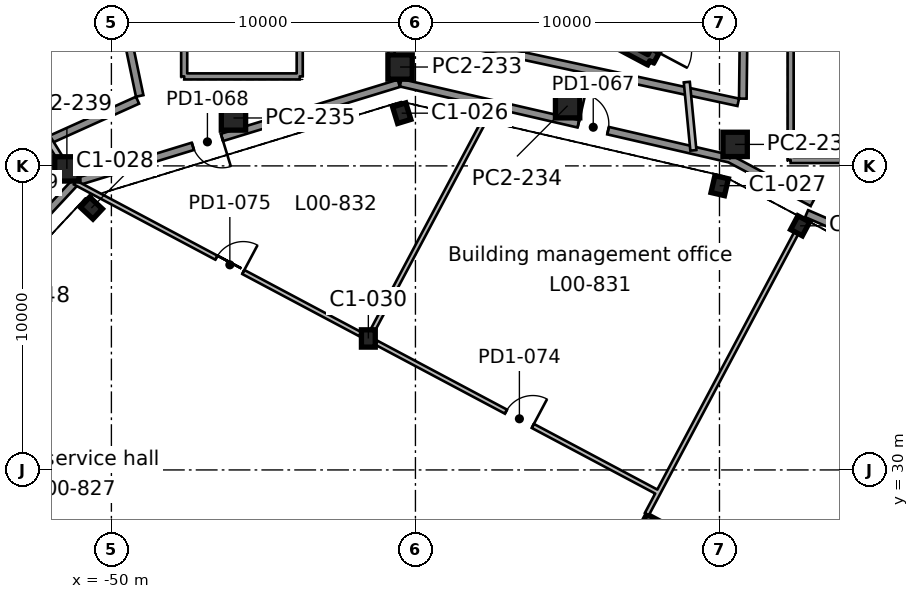
"""IFC4 building model, lengths in metres.
Left out: names, types, materials, properties, quantities, classifications, styles, units other than length and angle.
Written with IfcOpenShell. Run it as: python <this file> out.ifc"""

import sys

from ifc_helpers import new_model, si_unit, direction, frame, frame_2d, origin, origin_2d, place, context, subcontext, project, spatial, rectangle, i_section, extrude, element, fill, save


model = new_model("IFC4")
c1 = context("Model", 3, precision=1e-05, world=origin(), true_north=direction((0.0, 1.0)))
c2 = subcontext(c1, "Body", "Model", "MODEL_VIEW")
j1 = project(units=[si_unit("LENGTHUNIT", "METRE"), si_unit("PLANEANGLEUNIT", "RADIAN")], contexts=[c1])
p1 = place(None, origin())
s1 = spatial("IfcSite", under=j1, at=p1, CompositionType="ELEMENT")
p2 = place(p1, origin())
s2 = spatial("IfcBuilding", under=s1, at=p2, CompositionType="ELEMENT")
p3 = place(p2, origin())
s3 = spatial("IfcBuildingStorey", under=s2, at=p3, CompositionType="ELEMENT", Elevation=0.0)
p4 = place(p3, frame((-41.549, 34.324, 0.0), z_axis=(0.0, 0.0, 1.0), x_axis=(1.0, 0.0, 0.0)))
e1 = element("IfcColumn", 1, at=p4, inside=s3, PredefinedType="COLUMN", context=c2, shape_type="SweptSolid", body=[
    extrude(i_section(OverallWidth=0.455, OverallDepth=0.569, WebThickness=0.078, FlangeThickness=0.125, FilletRadius=0.015, at=origin_2d()), origin(), (0.0, 0.0, 1.0), 7.0),
])
p5 = place(p3, frame((-27.347, 38.03, 0.0), z_axis=(0.0, 0.0, 1.0), x_axis=(-0.882947592859, 0.469471562786, 0.0)))
e2 = element("IfcColumn", 2, at=p5, inside=s3, PredefinedType="COLUMN", context=c2, shape_type="SweptSolid", body=[
    extrude(i_section(OverallWidth=0.437, OverallDepth=0.513, WebThickness=0.061, FlangeThickness=0.097, FilletRadius=0.015, at=origin_2d()), origin(), (0.0, 0.0, 1.0), 7.0),
])
for number, where, z_axis, x_axis in (
    (3, (-50.66, 38.613, 0.0), (0.0, 0.0, 1.0), (-0.682, -0.731, 0.0)),
    (4, (-29.993, 39.35, 0.0), (0.0, 0.0, 1.0), (-0.974, 0.225, 0.0)),
    (5, (-40.452, 41.734, 0.0), (0.0, 0.0, 1.0), (-0.956, -0.292, 0.0)),
):
    element("IfcColumn", number, at=place(p3, frame(where, z_axis=z_axis, x_axis=x_axis)), inside=s3, PredefinedType="COLUMN", context=c2, shape_type="SweptSolid", body=[
        extrude(i_section(OverallWidth=0.455, OverallDepth=0.569, WebThickness=0.078, FlangeThickness=0.125, FilletRadius=0.015, at=origin_2d()), origin(), (0.0, 0.0, 1.0), 7.0),
    ])
p6 = place(p3, frame((-31.992, 28.336, 0.0), z_axis=(0.0, 0.0, 1.0), x_axis=(-0.46947084998, -0.882947971864, 0.0)))
e6 = element("IfcWall", 6, at=p6, inside=s3, PredefinedType="SHEAR", context=c2, shape_type="SweptSolid", body=[
    extrude(rectangle(XDim=20.0, YDim=0.9, at=frame_2d((10.0, 0.0))), origin(), (0.0, 0.0, 1.0), 7.0),
])
p7 = place(p6, frame((10.6, 0.0, 0.0)))
e7 = element("IfcOpeningElement", 7, at=p7, cuts=e6, PredefinedType="OPENING", context=c2, shape_type="SweptSolid", body=[
    extrude(rectangle(XDim=2.4, YDim=2.4, at=frame_2d((1.2, 1.2))), frame((0.0, 0.46, 0.0), z_axis=(0.0, -1.0, 0.0), x_axis=(1.0, 0.0, 0.0)), (0.0, 0.0, 1.0), 0.92),
])
p8 = place(p3, frame((-28.396, 50.784, 0.0), z_axis=(0.0, 0.0, 1.0), x_axis=(-0.469464178475, -0.882951519127, 0.0)))
e8 = element("IfcWall", 8, at=p8, inside=s3, PredefinedType="SHEAR", context=c2, shape_type="SweptSolid", body=[
    extrude(rectangle(XDim=8.3, YDim=0.3, at=frame_2d((4.15, 0.0))), origin(), (0.0, 0.0, 1.0), 7.0),
])
p9 = place(p8, frame((6.725, 0.0, 0.0)))
e9 = element("IfcOpeningElement", 9, at=p9, cuts=e8, PredefinedType="OPENING", context=c2, shape_type="SweptSolid", body=[
    extrude(rectangle(XDim=1.2, YDim=2.1, at=frame_2d((0.6, 1.05))), frame((0.0, 0.16, 0.0), z_axis=(0.0, -1.0, 0.0), x_axis=(1.0, 0.0, 0.0)), (0.0, 0.0, 1.0), 0.32),
])
p10 = place(p3, frame((-32.293, 43.456, 0.0), z_axis=(0.0, 0.0, 1.0), x_axis=(-0.882948761726, 0.46946936446, 0.0)))
e10 = element("IfcWall", 10, at=p10, inside=s3, PredefinedType="SHEAR", context=c2, shape_type="SweptSolid", body=[
    extrude(rectangle(XDim=3.75, YDim=0.3, at=frame_2d((1.875, 0.0))), origin(), (0.0, 0.0, 1.0), 7.0),
])
for number, where, z_axis, x_axis in (
    (11, (-51.464, 39.901, 0.0), (0.0, 0.0, 1.0), (1.0, 0.0, 0.0)),
    (12, (-29.485, 40.707, 0.0), (0.0, 0.0, 1.0), (1.0, 0.0, 0.0)),
    (13, (-45.985, 41.576, 0.0), (0.0, 0.0, 1.0), (1.0, 0.0, 0.0)),
    (14, (-34.995, 41.979, 0.0), (0.0, 0.0, 1.0), (1.0, 0.0, 0.0)),
    (15, (-40.505, 43.252, 0.0), (0.0, 0.0, 1.0), (1.0, 0.0, 0.0)),
):
    element("IfcColumn", number, at=place(p3, frame(where, z_axis=z_axis, x_axis=x_axis)), inside=s3, PredefinedType="COLUMN", context=c2, shape_type="SweptSolid", body=[
        extrude(rectangle(XDim=0.8, YDim=0.8, at=origin_2d()), origin(), (0.0, 0.0, 1.0), 6.37),
    ])
p11 = place(p3, frame((-29.205, 44.545, 7.0), z_axis=(0.0, 0.0, 1.0), x_axis=(-0.011825442041, -0.999930077016, 0.0)))
e16 = element("IfcWall", 16, at=p11, inside=s3, PredefinedType="STANDARD", context=c2, shape_type="SweptSolid", body=[
    extrude(rectangle(XDim=2.333, YDim=0.25, at=frame_2d((1.167, 0.0))), origin(), (0.0, 0.0, 1.0), 0.65),
])
p12 = place(p3, frame((-29.384, 42.092, 7.0), z_axis=(0.0, 0.0, 1.0), x_axis=(-0.977492846538, 0.210968563929, 0.0)))
e17 = element("IfcWall", 17, at=p12, inside=s3, PredefinedType="STANDARD", context=c2, shape_type="SweptSolid", body=[
    extrude(rectangle(XDim=11.025, YDim=0.25, at=frame_2d((5.512, 0.0))), origin(), (0.0, 0.0, 1.0), 0.65),
])
p13 = place(p3, frame((-49.387, 43.82, 7.0), z_axis=(0.0, 0.0, 1.0), x_axis=(0.204607360425, -0.978844128582, 0.0)))
e18 = element("IfcWall", 18, at=p13, inside=s3, PredefinedType="STANDARD", context=c2, shape_type="SweptSolid", body=[
    extrude(rectangle(XDim=1.552, YDim=0.25, at=frame_2d((0.776, 0.0))), origin(), (0.0, 0.0, 1.0), 0.65),
])
p14 = place(p3, frame((-49.14, 42.161, 7.0), z_axis=(0.0, 0.0, 1.0), x_axis=(-0.911744798019, -0.410757134187, 0.0)))
e19 = element("IfcWall", 19, at=p14, inside=s3, PredefinedType="STANDARD", context=c2, shape_type="SweptSolid", body=[
    extrude(rectangle(XDim=3.518, YDim=0.25, at=frame_2d((1.759, 0.0))), origin(), (0.0, 0.0, 1.0), 0.65),
])
for number, where, z_axis, x_axis in (
    (20, (-23.86, 40.193, 6.92), (0.0, 0.0, 1.0), (-1.0, 0.0, 0.0)),
    (21, (-27.66, 40.193, 6.92), (0.0, 0.0, 1.0), (0.0, 1.0, 0.0)),
):
    element("IfcWall", number, at=place(p3, frame(where, z_axis=z_axis, x_axis=x_axis)), inside=s3, PredefinedType="SOLIDWALL", context=c2, shape_type="SweptSolid", body=[
        extrude(rectangle(XDim=3.8, YDim=0.2, at=frame_2d((1.9, 0.0))), origin(), (0.0, 0.0, 1.0), 0.18),
    ])
p15 = place(p3, frame((-43.806, 42.943, 6.92), z_axis=(0.0, 0.0, 1.0), x_axis=(-1.0, 0.0, 0.0)))
e22 = element("IfcWall", 22, at=p15, inside=s3, PredefinedType="SOLIDWALL", context=c2, shape_type="SweptSolid", body=[
    extrude(rectangle(XDim=3.8, YDim=0.2, at=frame_2d((1.9, 0.0))), origin(), (0.0, 0.0, 1.0), 0.18),
])
for number, where, z_axis, x_axis in (
    (23, (-47.606, 42.943, 6.92), (0.0, 0.0, 1.0), (0.0, 1.0, 0.0)),
    (24, (-43.806, 46.743, 6.92), (0.0, 0.0, 1.0), (0.0, -1.0, 0.0)),
):
    element("IfcWall", number, at=place(p3, frame(where, z_axis=z_axis, x_axis=x_axis)), inside=s3, PredefinedType="SOLIDWALL", context=c2, shape_type="SweptSolid", body=[
        extrude(rectangle(XDim=3.8, YDim=0.2, at=frame_2d((1.9, 0.0))), origin(), (0.0, 0.0, 1.0), 0.18),
    ])
p16 = place(p3, frame((-31.075, 42.757, 0.0), z_axis=(0.0, 0.0, 1.0), x_axis=(0.095978377299, -0.995383419136, 0.0)))
e25 = element("IfcWall", 25, at=p16, inside=s3, PredefinedType="PARTITIONING", context=c2, shape_type="SweptSolid", body=[
    extrude(rectangle(XDim=2.256, YDim=0.2, at=frame_2d((1.128, 0.0))), origin(), (0.0, 0.0, 1.0), 6.37),
])
p17 = place(p3, frame((-30.853, 40.51, 0.0), z_axis=(0.0, 0.0, 1.0), x_axis=(0.974387829677, -0.224874092276, 0.0)))
e26 = element("IfcWall", 26, at=p17, inside=s3, PredefinedType="SOLIDWALL", context=c2, shape_type="SweptSolid", body=[
    extrude(rectangle(XDim=1.222, YDim=0.25, at=frame_2d((0.611, 0.0))), origin(), (0.0, 0.0, 1.0), 6.37),
])
p18 = place(p3, frame((-29.662, 40.235, 0.0), z_axis=(0.0, 0.0, 1.0), x_axis=(0.882951412921, -0.469464378224, 0.0)))
e27 = element("IfcWall", 27, at=p18, inside=s3, PredefinedType="SOLIDWALL", context=c2, shape_type="SweptSolid", body=[
    extrude(rectangle(XDim=3.079, YDim=0.25, at=frame_2d((1.54, 0.0))), origin(), (0.0, 0.0, 1.0), 6.37),
])
p19 = place(p3, frame((-27.134, 38.43, 0.0), z_axis=(0.0, 0.0, 1.0), x_axis=(0.918029849315, -0.396511280756, 0.0)))
e28 = element("IfcWall", 28, at=p19, inside=s3, PredefinedType="SOLIDWALL", context=c2, shape_type="SweptSolid", body=[
    extrude(rectangle(XDim=5.033, YDim=0.25, at=frame_2d((2.517, 0.0))), origin(), (0.0, 0.0, 1.0), 6.37),
])
p20 = place(p3, frame((-42.583, 52.754, 0.0), z_axis=(0.0, 0.0, 1.0), x_axis=(0.195149741705, -0.980773459221, 0.0)))
e29 = element("IfcWall", 29, at=p20, inside=s3, PredefinedType="PARTITIONING", context=c2, shape_type="SweptSolid", body=[
    extrude(rectangle(XDim=9.28, YDim=0.2, at=frame_2d((4.64, 0.0))), origin(), (0.0, 0.0, 1.0), 6.37),
])
p21 = place(p3, frame((-37.45, 42.033, 0.0), z_axis=(0.0, 0.0, 1.0), x_axis=(0.974369307298, -0.224954335355, 0.0)))
e30 = element("IfcWall", 30, at=p21, inside=s3, PredefinedType="SOLIDWALL", context=c2, shape_type="SweptSolid", body=[
    extrude(rectangle(XDim=6.769, YDim=0.25, at=frame_2d((3.385, 0.0))), origin(), (0.0, 0.0, 1.0), 6.37),
])
p22 = place(p21, frame((2.885, 0.0, 0.0)))
e31 = element("IfcOpeningElement", 31, at=p22, cuts=e30, PredefinedType="OPENING", context=c2, shape_type="SweptSolid", body=[
    extrude(rectangle(XDim=1.0, YDim=2.1, at=frame_2d((0.5, 1.05))), frame((0.0, 0.135, 0.0), z_axis=(0.0, -1.0, 0.0), x_axis=(1.0, 0.0, 0.0)), (0.0, 0.0, 1.0), 0.27),
])
p23 = place(p3, frame((-40.487, 42.734, 0.0), z_axis=(0.0, 0.0, 1.0), x_axis=(0.974387235192, -0.224876668186, 0.0)))
e32 = element("IfcWall", 32, at=p23, inside=s3, PredefinedType="SOLIDWALL", context=c2, shape_type="SweptSolid", body=[
    extrude(rectangle(XDim=3.117, YDim=0.25, at=frame_2d((1.559, 0.0))), origin(), (0.0, 0.0, 1.0), 6.37),
])
p24 = place(p3, frame((-56.755, 48.368, 0.0), z_axis=(0.0, 0.0, 1.0), x_axis=(0.529920498626, -0.848047324821, 0.0)))
e33 = element("IfcWall", 33, at=p24, inside=s3, PredefinedType="PARTITIONING", context=c2, shape_type="SweptSolid", body=[
    extrude(rectangle(XDim=9.512, YDim=0.2, at=frame_2d((4.756, 0.0))), origin(), (0.0, 0.0, 1.0), 6.37),
])
p25 = place(p3, frame((-51.193, 39.459, 0.0), z_axis=(0.0, 0.0, 1.0), x_axis=(0.95625380249, 0.292538314113, 0.0)))
e34 = element("IfcWall", 34, at=p25, inside=s3, PredefinedType="SOLIDWALL", context=c2, shape_type="SweptSolid", body=[
    extrude(rectangle(XDim=11.133, YDim=0.25, at=frame_2d((5.566, 0.0))), origin(), (0.0, 0.0, 1.0), 6.37),
])
p26 = place(p25, frame((4.05, 0.0, 0.0)))
e35 = element("IfcOpeningElement", 35, at=p26, cuts=e34, PredefinedType="OPENING", context=c2, shape_type="SweptSolid", body=[
    extrude(rectangle(XDim=1.0, YDim=2.1, at=frame_2d((0.5, 1.05))), frame((0.0, 0.135, 0.0), z_axis=(0.0, -1.0, 0.0), x_axis=(1.0, 0.0, 0.0)), (0.0, 0.0, 1.0), 0.27),
])
p27 = place(p3, frame((-54.972, 35.405, 0.0), z_axis=(0.0, 0.0, 1.0), x_axis=(0.681862401645, 0.731480461273, 0.0)))
e36 = element("IfcWall", 36, at=p27, inside=s3, PredefinedType="SOLIDWALL", context=c2, shape_type="SweptSolid", body=[
    extrude(rectangle(XDim=5.535, YDim=0.25, at=frame_2d((2.768, 0.0))), origin(), (0.0, 0.0, 1.0), 6.37),
])
p28 = place(p27, frame((2.268, 0.0, 0.0)))
e37 = element("IfcOpeningElement", 37, at=p28, cuts=e36, PredefinedType="OPENING", context=c2, shape_type="SweptSolid", body=[
    extrude(rectangle(XDim=1.0, YDim=2.1, at=frame_2d((0.5, 1.05))), frame((0.0, 0.135, 0.0), z_axis=(0.0, -1.0, 0.0), x_axis=(1.0, 0.0, 0.0)), (0.0, 0.0, 1.0), 0.27),
])
p29 = place(p3, frame((-32.013, 29.254, 0.0), z_axis=(0.0, 0.0, 1.0), x_axis=(-0.882951328121, 0.469464537713, 0.0)))
e38 = element("IfcWall", 38, at=p29, inside=s3, PredefinedType="PARTITIONING", context=c2, shape_type="SweptSolid", body=[
    extrude(rectangle(XDim=10.502, YDim=0.15, at=frame_2d((5.251, 0.0))), origin(), (0.0, 0.0, 1.0), 6.55),
])
p30 = place(p29, frame((4.673, 0.0, 0.0)))
e39 = element("IfcOpeningElement", 39, at=p30, cuts=e38, PredefinedType="OPENING", context=c2, shape_type="SweptSolid", body=[
    extrude(rectangle(XDim=1.0, YDim=2.1, at=frame_2d((0.5, 1.05))), frame((0.0, 0.085, 0.0), z_axis=(0.0, -1.0, 0.0), x_axis=(1.0, 0.0, 0.0)), (0.0, 0.0, 1.0), 0.17),
])
p31 = place(p3, frame((-41.812, 34.463, 0.0), z_axis=(0.0, 0.0, 1.0), x_axis=(-0.882945529205, 0.469475443935, 0.0)))
e40 = element("IfcWall", 40, at=p31, inside=s3, PredefinedType="PARTITIONING", context=c2, shape_type="SweptSolid", body=[
    extrude(rectangle(XDim=9.569, YDim=0.15, at=frame_2d((4.784, 0.0))), origin(), (0.0, 0.0, 1.0), 6.55),
])
p32 = place(p31, frame((4.362, 0.0, 0.0)))
e41 = element("IfcOpeningElement", 41, at=p32, cuts=e40, PredefinedType="OPENING", context=c2, shape_type="SweptSolid", body=[
    extrude(rectangle(XDim=1.0, YDim=2.1, at=frame_2d((0.5, 1.05))), frame((0.0, 0.085, 0.0), z_axis=(0.0, -1.0, 0.0), x_axis=(1.0, 0.0, 0.0)), (0.0, 0.0, 1.0), 0.17),
])
p33 = place(p3, frame((-50.26, 38.956, 0.0), z_axis=(0.0, 0.0, 1.0), x_axis=(-0.882925119508, 0.469513826572, 0.0)))
e42 = element("IfcWall", 42, at=p33, inside=s3, PredefinedType="PARTITIONING", context=c2, shape_type="SweptSolid", body=[
    extrude(rectangle(XDim=1.062, YDim=0.15, at=frame_2d((0.531, 0.0))), origin(), (0.0, 0.0, 1.0), 6.55),
])
p34 = place(p3, frame((-32.389, 28.547, 0.0), z_axis=(0.0, 0.0, 1.0), x_axis=(0.469582372655, 0.882888665287, 0.0)))
e43 = element("IfcWall", 43, at=p34, inside=s3, PredefinedType="PARTITIONING", context=c2, shape_type="SweptSolid", body=[
    extrude(rectangle(XDim=0.794, YDim=0.15, at=frame_2d((0.397, 0.0))), origin(), (0.0, 0.0, 1.0), 6.55),
])
p35 = place(p3, frame((-37.45, 42.033, 0.0), z_axis=(0.0, 0.0, 1.0), x_axis=(-0.46946644805, -0.882950312393, 0.0)))
e44 = element("IfcWall", 44, at=p35, inside=s3, PredefinedType="PARTITIONING", context=c2, shape_type="SweptSolid", body=[
    extrude(rectangle(XDim=8.373, YDim=0.15, at=frame_2d((4.187, 0.0))), origin(), (0.0, 0.0, 1.0), 6.55),
])
p36 = place(p3, frame((-32.015, 29.25, 0.0), z_axis=(0.0, 0.0, 1.0), x_axis=(0.469462919124, 0.882952188721, 0.0)))
e45 = element("IfcWall", 45, at=p36, inside=s3, PredefinedType="PARTITIONING", context=c2, shape_type="SweptSolid", body=[
    extrude(rectangle(XDim=9.687, YDim=0.15, at=frame_2d((4.844, 0.0))), origin(), (0.0, 0.0, 1.0), 6.55),
])
p37 = place(p3, frame((0.0, 0.0, 6.37)))
p38 = place(p37, frame((-25.76, 42.093, 0.0)))
p39 = place(p38, frame((0.0, 0.0, 0.5)))
e46 = element("IfcWindow", 46, at=p39, inside=s3, PartitioningType="SINGLE_PANEL", PredefinedType="SKYLIGHT", context=c2, shape_type="SweptSolid", body=[
    extrude(rectangle(XDim=3.6, YDim=3.6, at=origin_2d()), origin(), (0.0, 0.0, 1.0), 0.05),
])
p40 = place(p37, frame((-45.706, 44.843, 0.0)))
p41 = place(p40, frame((0.0, 0.0, 0.5)))
e47 = element("IfcWindow", 47, at=p41, inside=s3, PartitioningType="SINGLE_PANEL", PredefinedType="SKYLIGHT", context=c2, shape_type="SweptSolid", body=[
    extrude(rectangle(XDim=3.6, YDim=3.6, at=origin_2d()), origin(), (0.0, 0.0, 1.0), 0.05),
])
p42 = place(p30, frame((1.0, 0.0, 0.0), z_axis=(0.0, 0.0, 1.0), x_axis=(-1.0, 0.0, 0.0)))
e48 = element("IfcDoor", 48, at=p42, inside=s3, OperationType="SINGLE_SWING_RIGHT", PredefinedType="DOOR", context=c2, shape_type="SweptSolid", body=[
    extrude(rectangle(XDim=1.0, YDim=2.1, at=frame_2d((0.5, 1.05))), frame((0.0, 0.025, 0.0), z_axis=(0.0, -1.0, 0.0), x_axis=(1.0, 0.0, 0.0)), (0.0, 0.0, 1.0), 0.05),
])
fill(e39, e48)
p43 = place(p32, frame((1.0, 0.0, 0.0), z_axis=(0.0, 0.0, 1.0), x_axis=(-1.0, 0.0, 0.0)))
e49 = element("IfcDoor", 49, at=p43, inside=s3, OperationType="SINGLE_SWING_RIGHT", PredefinedType="DOOR", context=c2, shape_type="SweptSolid", body=[
    extrude(rectangle(XDim=1.0, YDim=2.1, at=frame_2d((0.5, 1.05))), frame((0.0, 0.025, 0.0), z_axis=(0.0, -1.0, 0.0), x_axis=(1.0, 0.0, 0.0)), (0.0, 0.0, 1.0), 0.05),
])
fill(e41, e49)
p44 = place(p26, frame((1.0, 0.0, 0.0), z_axis=(0.0, 0.0, 1.0), x_axis=(-1.0, 0.0, 0.0)))
e50 = element("IfcDoor", 50, at=p44, inside=s3, OperationType="SINGLE_SWING_LEFT", PredefinedType="DOOR", context=c2, shape_type="SweptSolid", body=[
    extrude(rectangle(XDim=1.0, YDim=2.1, at=frame_2d((0.5, 1.05))), frame((0.0, 0.025, 0.0), z_axis=(0.0, -1.0, 0.0), x_axis=(1.0, 0.0, 0.0)), (0.0, 0.0, 1.0), 0.05),
])
fill(e35, e50)
p45 = place(p22, origin())
e51 = element("IfcDoor", 51, at=p45, inside=s3, OperationType="SINGLE_SWING_LEFT", PredefinedType="DOOR", context=c2, shape_type="SweptSolid", body=[
    extrude(rectangle(XDim=1.0, YDim=2.1, at=frame_2d((0.5, 1.05))), frame((0.0, 0.025, 0.0), z_axis=(0.0, -1.0, 0.0), x_axis=(1.0, 0.0, 0.0)), (0.0, 0.0, 1.0), 0.05),
])
fill(e31, e51)
save(model, sys.argv[1])
